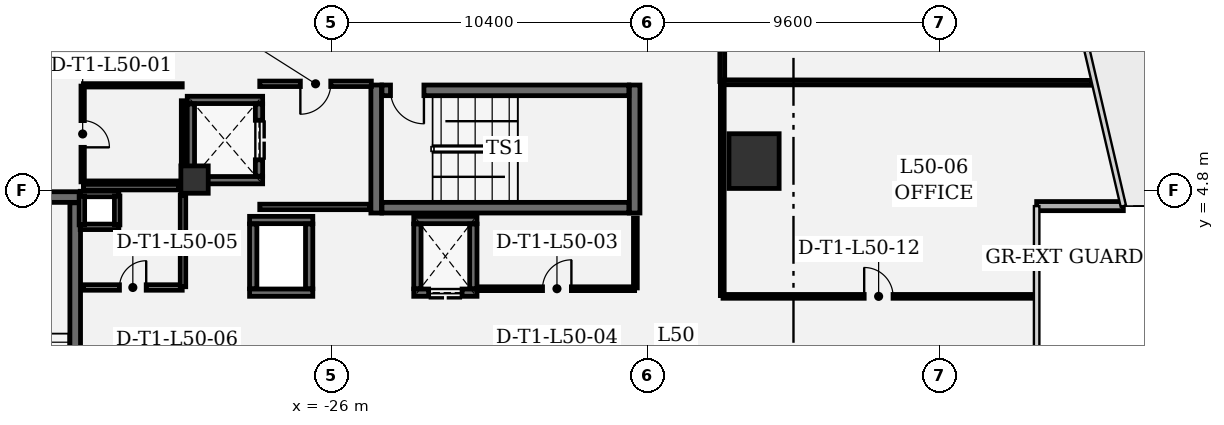
"""IFC4 building model, lengths in metres.
Left out: names, types, materials, properties, quantities, classifications, styles, units other than length and angle.
Written with IfcOpenShell. Run it as: python <this file> out.ifc"""

import sys

from ifc_helpers import new_model, si_unit, direction, frame, frame_2d, origin, origin_2d, place, context, subcontext, project, spatial, rectangle, extrude, element, fill, save


model = new_model("IFC4")
c1 = context("Model", 3, precision=1e-05, world=origin(), true_north=direction((0.0, 1.0)))
c2 = subcontext(c1, "Body", "Model", "MODEL_VIEW")
j1 = project(units=[si_unit("LENGTHUNIT", "METRE"), si_unit("PLANEANGLEUNIT", "RADIAN")], contexts=[c1])
p1 = place(None, origin())
s1 = spatial("IfcSite", under=j1, at=p1, CompositionType="ELEMENT")
p2 = place(p1, origin())
s2 = spatial("IfcBuilding", under=s1, at=p2, CompositionType="ELEMENT")
p3 = place(p2, frame((0.0, 0.0, 217.2)))
s3 = spatial("IfcBuildingStorey", under=s2, at=p3, CompositionType="ELEMENT", Elevation=217.2)
p4 = place(p3, frame((-12.097, 5.758, 0.0), z_axis=(0.0, 0.0, 1.0), x_axis=(1.0, 0.0, 0.0)))
e1 = element("IfcColumn", 1, at=p4, inside=s3, PredefinedType="COLUMN", context=c2, shape_type="SweptSolid", body=[
    extrude(rectangle(XDim=1.65, YDim=1.8, at=origin_2d()), origin(), (0.0, 0.0, 1.0), 4.05),
])
p5 = place(p3, frame((-30.5, 5.15, 0.0), z_axis=(0.0, 0.0, 1.0), x_axis=(1.0, 0.0, 0.0)))
e2 = element("IfcColumn", 2, at=p5, inside=s3, PredefinedType="COLUMN", context=c2, shape_type="SweptSolid", body=[
    extrude(rectangle(XDim=0.9, YDim=0.9, at=origin_2d()), origin(), (0.0, 0.0, 1.0), 4.05),
])
p6 = place(p3, frame((-2.802, 4.277, 0.0), z_axis=(0.0, 0.0, 1.0), x_axis=(1.0, 0.0, 0.0)))
e3 = element("IfcWall", 3, at=p6, inside=s3, PredefinedType="SOLIDWALL", context=c2, shape_type="SweptSolid", body=[
    extrude(rectangle(XDim=2.851, YDim=0.3, at=frame_2d((1.426, 0.0))), origin(), (0.0, 0.0, 1.0), 3.78),
])
for number, where, z_axis, x_axis in (
    (4, (-24.525, 8.26, 0.0), (0.0, 0.0, 1.0), (0.0, -1.0, 0.0)),
    (5, (-16.025, 4.05, 0.0), (0.0, 0.0, 1.0), (0.0, 1.0, 0.0)),
):
    element("IfcWall", number, at=place(p3, frame(where, z_axis=z_axis, x_axis=x_axis)), inside=s3, PredefinedType="SHEAR", context=c2, shape_type="SweptSolid", body=[
        extrude(rectangle(XDim=4.21, YDim=0.35, at=frame_2d((2.105, 0.0))), origin(), (0.0, 0.0, 1.0), 3.78),
    ])
p7 = place(p3, frame((-24.335, 4.225, 0.0), z_axis=(0.0, 0.0, 1.0), x_axis=(1.0, 0.0, 0.0)))
e6 = element("IfcWall", 6, at=p7, inside=s3, PredefinedType="SHEAR", context=c2, shape_type="SweptSolid", body=[
    extrude(rectangle(XDim=8.12, YDim=0.35, at=frame_2d((4.06, 0.0))), origin(), (0.0, 0.0, 1.0), 3.78),
])
p8 = place(p3, frame((-16.215, 8.085, 0.0), z_axis=(0.0, 0.0, 1.0), x_axis=(-1.0, 0.0, 0.0)))
e7 = element("IfcWall", 7, at=p8, inside=s3, PredefinedType="SHEAR", context=c2, shape_type="SweptSolid", body=[
    extrude(rectangle(XDim=8.12, YDim=0.35, at=frame_2d((4.06, 0.0))), origin(), (0.0, 0.0, 1.0), 3.78),
])
p9 = place(p8, frame((6.74, 0.0, 0.0)))
e8 = element("IfcOpeningElement", 8, at=p9, cuts=e7, PredefinedType="OPENING", context=c2, shape_type="SweptSolid", body=[
    extrude(rectangle(XDim=1.1, YDim=2.2, at=frame_2d((0.55, 1.1))), frame((0.0, 0.185, 0.0), z_axis=(0.0, -1.0, 0.0), x_axis=(1.0, 0.0, 0.0)), (0.0, 0.0, 1.0), 0.37),
])
p10 = place(p3, frame((-34.25, 4.575, 0.0), z_axis=(0.0, 0.0, 1.0), x_axis=(-1.0, 0.0, 0.0)))
e9 = element("IfcWall", 9, at=p10, inside=s3, PredefinedType="SHEAR", context=c2, shape_type="SweptSolid", body=[
    extrude(rectangle(XDim=4.21, YDim=0.35, at=frame_2d((2.105, 0.0))), origin(), (0.0, 0.0, 1.0), 3.78),
])
p11 = place(p3, frame((-34.425, -4.385, 0.0), z_axis=(0.0, 0.0, 1.0), x_axis=(0.0, 1.0, 0.0)))
e10 = element("IfcWall", 10, at=p11, inside=s3, PredefinedType="SHEAR", context=c2, shape_type="SweptSolid", body=[
    extrude(rectangle(XDim=8.77, YDim=0.35, at=frame_2d((4.385, 0.0))), origin(), (0.0, 0.0, 1.0), 3.78),
])
for number, where, z_axis, x_axis in (
    (11, (-28.26, 5.13, 0.0), (0.0, 0.0, 1.0), (-1.0, 0.0, 0.0)),
    (12, (-30.74, 7.77, 0.0), (0.0, 0.0, 1.0), (1.0, 0.0, 0.0)),
):
    element("IfcWall", number, at=place(p3, frame(where, z_axis=z_axis, x_axis=x_axis)), inside=s3, PredefinedType="SHEAR", context=c2, shape_type="SweptSolid", body=[
        extrude(rectangle(XDim=2.48, YDim=0.24, at=frame_2d((1.24, 0.0))), origin(), (0.0, 0.0, 1.0), 3.78),
    ])
p12 = place(p3, frame((-30.62, 5.262, 0.0), z_axis=(0.0, 0.0, 1.0), x_axis=(0.0, 1.0, 0.0)))
e13 = element("IfcWall", 13, at=p12, inside=s3, PredefinedType="SHEAR", context=c2, shape_type="SweptSolid", body=[
    extrude(rectangle(XDim=2.376, YDim=0.24, at=frame_2d((1.188, 0.0))), origin(), (0.0, 0.0, 1.0), 3.78),
])
p13 = place(p3, frame((-28.38, 7.638, 0.0), z_axis=(0.0, 0.0, 1.0), x_axis=(0.0, -1.0, 0.0)))
e14 = element("IfcWall", 14, at=p13, inside=s3, PredefinedType="SHEAR", context=c2, shape_type="SweptSolid", body=[
    extrude(rectangle(XDim=2.376, YDim=0.24, at=frame_2d((1.188, 0.0))), origin(), (0.0, 0.0, 1.0), 3.78),
])
p14 = place(p13, frame((0.538, 0.0, 0.0)))
e15 = element("IfcOpeningElement", 15, at=p14, cuts=e14, PredefinedType="OPENING", context=c2, shape_type="SweptSolid", body=[
    extrude(rectangle(XDim=1.3, YDim=2.3, at=frame_2d((0.65, 1.15))), frame((0.0, 0.13, 0.0), z_axis=(0.0, -1.0, 0.0), x_axis=(1.0, 0.0, 0.0)), (0.0, 0.0, 1.0), 0.26),
])
for number, where, z_axis, x_axis in (
    (16, (-26.61, 1.43, 0.0), (0.0, 0.0, 1.0), (-1.0, 0.0, 0.0)),
    (17, (-28.69, 3.82, 0.0), (0.0, 0.0, 1.0), (1.0, 0.0, 0.0)),
):
    element("IfcWall", number, at=place(p3, frame(where, z_axis=z_axis, x_axis=x_axis)), inside=s3, PredefinedType="SHEAR", context=c2, shape_type="SweptSolid", body=[
        extrude(rectangle(XDim=2.08, YDim=0.24, at=frame_2d((1.04, 0.0))), origin(), (0.0, 0.0, 1.0), 3.78),
    ])
for number, where, z_axis, x_axis in (
    (18, (-28.57, 1.562, 0.0), (0.0, 0.0, 1.0), (0.0, 1.0, 0.0)),
    (19, (-26.73, 3.688, 0.0), (0.0, 0.0, 1.0), (0.0, -1.0, 0.0)),
):
    element("IfcWall", number, at=place(p3, frame(where, z_axis=z_axis, x_axis=x_axis)), inside=s3, PredefinedType="SHEAR", context=c2, shape_type="SweptSolid", body=[
        extrude(rectangle(XDim=2.126, YDim=0.24, at=frame_2d((1.063, 0.0))), origin(), (0.0, 0.0, 1.0), 3.78),
    ])
p15 = place(p3, frame((-21.21, 1.43, 0.0), z_axis=(0.0, 0.0, 1.0), x_axis=(-1.0, 0.0, 0.0)))
e20 = element("IfcWall", 20, at=p15, inside=s3, PredefinedType="SHEAR", context=c2, shape_type="SweptSolid", body=[
    extrude(rectangle(XDim=2.08, YDim=0.24, at=frame_2d((1.04, 0.0))), origin(), (0.0, 0.0, 1.0), 3.78),
])
p16 = place(p15, frame((0.49, 0.0, 0.0)))
e21 = element("IfcOpeningElement", 21, at=p16, cuts=e20, PredefinedType="OPENING", context=c2, shape_type="SweptSolid", body=[
    extrude(rectangle(XDim=1.1, YDim=2.2, at=frame_2d((0.55, 1.1))), frame((0.0, 0.13, 0.0), z_axis=(0.0, -1.0, 0.0), x_axis=(1.0, 0.0, 0.0)), (0.0, 0.0, 1.0), 0.26),
])
p17 = place(p3, frame((-23.29, 3.82, 0.0), z_axis=(0.0, 0.0, 1.0), x_axis=(1.0, 0.0, 0.0)))
e22 = element("IfcWall", 22, at=p17, inside=s3, PredefinedType="SHEAR", context=c2, shape_type="SweptSolid", body=[
    extrude(rectangle(XDim=2.08, YDim=0.24, at=frame_2d((1.04, 0.0))), origin(), (0.0, 0.0, 1.0), 3.78),
])
for number, where, z_axis, x_axis in (
    (23, (-23.17, 1.562, 0.0), (0.0, 0.0, 1.0), (0.0, 1.0, 0.0)),
    (24, (-21.33, 3.688, 0.0), (0.0, 0.0, 1.0), (0.0, -1.0, 0.0)),
):
    element("IfcWall", number, at=place(p3, frame(where, z_axis=z_axis, x_axis=x_axis)), inside=s3, PredefinedType="SHEAR", context=c2, shape_type="SweptSolid", body=[
        extrude(rectangle(XDim=2.126, YDim=0.24, at=frame_2d((1.063, 0.0))), origin(), (0.0, 0.0, 1.0), 3.78),
    ])
for number, where, z_axis, x_axis in (
    (25, (-32.99, 3.595, 0.0), (0.0, 0.0, 1.0), (-1.0, 0.0, 0.0)),
    (26, (-34.26, 4.675, 0.0), (0.0, 0.0, 1.0), (1.0, 0.0, 0.0)),
):
    element("IfcWall", number, at=place(p3, frame(where, z_axis=z_axis, x_axis=x_axis)), inside=s3, PredefinedType="PARTITIONING", context=c2, shape_type="SweptSolid", body=[
        extrude(rectangle(XDim=1.27, YDim=0.18, at=frame_2d((0.635, 0.0))), origin(), (0.0, 0.0, 1.0), 3.78),
    ])
for number, where, z_axis, x_axis in (
    (27, (-34.205, 3.66, 0.0), (0.0, 0.0, 1.0), (0.0, 1.0, 0.0)),
    (28, (-33.045, 4.61, 0.0), (0.0, 0.0, 1.0), (0.0, -1.0, 0.0)),
):
    element("IfcWall", number, at=place(p3, frame(where, z_axis=z_axis, x_axis=x_axis)), inside=s3, PredefinedType="PARTITIONING", context=c2, shape_type="SweptSolid", body=[
        extrude(rectangle(XDim=0.95, YDim=0.18, at=frame_2d((0.475, 0.0))), origin(), (0.0, 0.0, 1.0), 3.78),
    ])
p18 = place(p3, frame((-28.355, 4.25, 0.0), z_axis=(0.0, 0.0, 1.0), x_axis=(1.0, 0.0, 0.0)))
e29 = element("IfcWall", 29, at=p18, inside=s3, PredefinedType="PARTITIONING", context=c2, shape_type="SweptSolid", body=[
    extrude(rectangle(XDim=3.622, YDim=0.18, at=frame_2d((1.811, 0.0))), origin(), (0.0, 0.0, 1.0), 3.78),
])
p19 = place(p3, frame((-24.684, 8.3, 0.0), z_axis=(0.0, 0.0, 1.0), x_axis=(-1.0, 0.0, 0.0)))
e30 = element("IfcWall", 30, at=p19, inside=s3, PredefinedType="PARTITIONING", context=c2, shape_type="SweptSolid", body=[
    extrude(rectangle(XDim=3.671, YDim=0.18, at=frame_2d((1.835, 0.0))), origin(), (0.0, 0.0, 1.0), 3.78),
])
p20 = place(p19, frame((1.335, 0.0, 0.0)))
e31 = element("IfcOpeningElement", 31, at=p20, cuts=e30, PredefinedType="OPENING", context=c2, shape_type="SweptSolid", body=[
    extrude(rectangle(XDim=1.0, YDim=2.15, at=frame_2d((0.5, 1.075))), frame((0.0, 0.1, 0.0), z_axis=(0.0, -1.0, 0.0), x_axis=(1.0, 0.0, 0.0)), (0.0, 0.0, 1.0), 0.2),
])
p21 = place(p3, frame((-34.18, 8.225, 0.0), z_axis=(0.0, 0.0, 1.0), x_axis=(0.0, -1.0, 0.0)))
e32 = element("IfcWall", 32, at=p21, inside=s3, PredefinedType="PARTITIONING", context=c2, shape_type="SweptSolid", body=[
    extrude(rectangle(XDim=3.15, YDim=0.11, at=frame_2d((1.575, 0.0))), origin(), (0.0, 0.0, 1.0), 3.78),
])
p22 = place(p21, frame((1.135, 0.0, 0.0)))
e33 = element("IfcOpeningElement", 33, at=p22, cuts=e32, PredefinedType="OPENING", context=c2, shape_type="SweptSolid", body=[
    extrude(rectangle(XDim=0.88, YDim=2.1, at=frame_2d((0.44, 1.05))), frame((0.0, 0.065, 0.0), z_axis=(0.0, -1.0, 0.0), x_axis=(1.0, 0.0, 0.0)), (0.0, 0.0, 1.0), 0.13),
])
p23 = place(p3, frame((-34.155, 5.05, 0.0), z_axis=(0.0, 0.0, 1.0), x_axis=(1.0, 0.0, 0.0)))
e34 = element("IfcWall", 34, at=p23, inside=s3, PredefinedType="PARTITIONING", context=c2, shape_type="SweptSolid", body=[
    extrude(rectangle(XDim=3.14, YDim=0.11, at=frame_2d((1.57, 0.0))), origin(), (0.0, 0.0, 1.0), 3.78),
])
p24 = place(p3, frame((-30.88, 5.665, 0.0), z_axis=(0.0, 0.0, 1.0), x_axis=(0.0, 1.0, 0.0)))
e35 = element("IfcWall", 35, at=p24, inside=s3, PredefinedType="PARTITIONING", context=c2, shape_type="SweptSolid", body=[
    extrude(rectangle(XDim=2.078, YDim=0.11, at=frame_2d((1.039, 0.0))), origin(), (0.0, 0.0, 1.0), 3.78),
])
p25 = place(p3, frame((-30.905, 8.25, 0.0), z_axis=(0.0, 0.0, 1.0), x_axis=(-1.0, 0.0, 0.0)))
e36 = element("IfcWall", 36, at=p25, inside=s3, PredefinedType="PARTITIONING", context=c2, shape_type="SweptSolid", body=[
    extrude(rectangle(XDim=3.25, YDim=0.11, at=frame_2d((1.625, 0.0))), origin(), (0.0, 0.0, 1.0), 3.78),
])
p26 = place(p3, frame((-21.134, 1.56, 0.0), z_axis=(0.0, 0.0, 1.0), x_axis=(1.0, 0.0, 0.0)))
e37 = element("IfcWall", 37, at=p26, inside=s3, PredefinedType="PARTITIONING", context=c2, shape_type="SweptSolid", body=[
    extrude(rectangle(XDim=5.109, YDim=0.125, at=frame_2d((2.554, 0.0))), origin(), (0.0, 0.0, 1.0), 3.78),
])
p27 = place(p26, frame((2.079, 0.0, 0.0)))
e38 = element("IfcOpeningElement", 38, at=p27, cuts=e37, PredefinedType="OPENING", context=c2, shape_type="SweptSolid", body=[
    extrude(rectangle(XDim=0.95, YDim=2.15, at=frame_2d((0.475, 1.075))), frame((0.0, 0.073, 0.0), z_axis=(0.0, -1.0, 0.0), x_axis=(1.0, 0.0, 0.0)), (0.0, 0.0, 1.0), 0.145),
])
p28 = place(p3, frame((-16.0, 1.585, 0.0), z_axis=(0.0, 0.0, 1.0), x_axis=(0.0, 1.0, 0.0)))
e39 = element("IfcWall", 39, at=p28, inside=s3, PredefinedType="PARTITIONING", context=c2, shape_type="SweptSolid", body=[
    extrude(rectangle(XDim=2.302, YDim=0.125, at=frame_2d((1.151, 0.0))), origin(), (0.0, 0.0, 1.0), 3.78),
])
p29 = place(p3, frame((-34.155, 1.6, 0.0), z_axis=(0.0, 0.0, 1.0), x_axis=(1.0, 0.0, 0.0)))
e40 = element("IfcWall", 40, at=p29, inside=s3, PredefinedType="PARTITIONING", context=c2, shape_type="SweptSolid", body=[
    extrude(rectangle(XDim=3.25, YDim=0.18, at=frame_2d((1.625, 0.0))), origin(), (0.0, 0.0, 1.0), 3.78),
])
p30 = place(p29, frame((1.185, 0.0, 0.0)))
e41 = element("IfcOpeningElement", 41, at=p30, cuts=e40, PredefinedType="OPENING", context=c2, shape_type="SweptSolid", body=[
    extrude(rectangle(XDim=0.88, YDim=2.1, at=frame_2d((0.44, 1.05))), frame((0.0, 0.1, 0.0), z_axis=(0.0, -1.0, 0.0), x_axis=(1.0, 0.0, 0.0)), (0.0, 0.0, 1.0), 0.2),
])
p31 = place(p3, frame((-30.88, 1.625, 0.0), z_axis=(0.0, 0.0, 1.0), x_axis=(0.0, 1.0, 0.0)))
e42 = element("IfcWall", 42, at=p31, inside=s3, PredefinedType="PARTITIONING", context=c2, shape_type="SweptSolid", body=[
    extrude(rectangle(XDim=3.01, YDim=0.18, at=frame_2d((1.505, 0.0))), origin(), (0.0, 0.0, 1.0), 3.78),
])
p32 = place(p3, frame((-31.015, 4.9, 0.0), z_axis=(0.0, 0.0, 1.0), x_axis=(-1.0, 0.0, 0.0)))
e43 = element("IfcWall", 43, at=p32, inside=s3, PredefinedType="PARTITIONING", context=c2, shape_type="SweptSolid", body=[
    extrude(rectangle(XDim=3.14, YDim=0.18, at=frame_2d((1.57, 0.0))), origin(), (0.0, 0.0, 1.0), 3.78),
])
p33 = place(p3, frame((-13.142, 10.733, 0.0), z_axis=(0.0, 0.0, 1.0), x_axis=(0.0, -1.0, 0.0)))
e44 = element("IfcWall", 44, at=p33, inside=s3, PredefinedType="PARTITIONING", context=c2, shape_type="SweptSolid", body=[
    extrude(rectangle(XDim=2.358, YDim=0.16, at=frame_2d((1.179, 0.0))), origin(), (0.0, 0.0, 1.0), 3.0),
])
p34 = place(p3, frame((-13.117, 8.35, 0.0), z_axis=(0.0, 0.0, 1.0), x_axis=(0.999998922727, -0.001467836675, 0.0)))
e45 = element("IfcWall", 45, at=p34, inside=s3, PredefinedType="PARTITIONING", context=c2, shape_type="SweptSolid", body=[
    extrude(rectangle(XDim=12.142, YDim=0.16, at=frame_2d((6.071, 0.0))), origin(), (0.0, 0.0, 1.0), 3.344),
])
p35 = place(p3, frame((-13.142, 8.317, 0.0), z_axis=(0.0, 0.0, 1.0), x_axis=(0.0, -1.0, 0.0)))
e46 = element("IfcWall", 46, at=p35, inside=s3, PredefinedType="PARTITIONING", context=c2, shape_type="SweptSolid", body=[
    extrude(rectangle(XDim=6.984, YDim=0.125, at=frame_2d((3.492, 0.0))), origin(), (0.0, 0.0, 1.0), 3.0),
])
p36 = place(p3, frame((-13.117, 1.308, 0.0), z_axis=(0.0, 0.0, 1.0), x_axis=(1.0, 0.0, 0.0)))
e47 = element("IfcWall", 47, at=p36, inside=s3, PredefinedType="PARTITIONING", context=c2, shape_type="SweptSolid", body=[
    extrude(rectangle(XDim=10.236, YDim=0.125, at=frame_2d((5.118, 0.0))), origin(), (0.0, 0.0, 1.0), 3.78),
])
p37 = place(p36, frame((4.643, 0.0, 0.0)))
e48 = element("IfcOpeningElement", 48, at=p37, cuts=e47, PredefinedType="OPENING", context=c2, shape_type="SweptSolid", body=[
    extrude(rectangle(XDim=0.95, YDim=2.15, at=frame_2d((0.475, 1.075))), frame((0.0, 0.073, 0.0), z_axis=(0.0, -1.0, 0.0), x_axis=(1.0, 0.0, 0.0)), (0.0, 0.0, 1.0), 0.145),
])
p38 = place(p9, origin())
e49 = element("IfcDoor", 49, at=p38, inside=s3, OperationType="SINGLE_SWING_LEFT", PredefinedType="DOOR", context=c2, shape_type="SweptSolid", body=[
    extrude(rectangle(XDim=1.1, YDim=2.2, at=frame_2d((0.55, 1.1))), frame((0.0, 0.025, 0.0), z_axis=(0.0, -1.0, 0.0), x_axis=(1.0, 0.0, 0.0)), (0.0, 0.0, 1.0), 0.05),
])
fill(e8, e49)
p39 = place(p14, origin())
e50 = element("IfcDoor", 50, at=p39, inside=s3, OperationType="DOUBLE_DOOR_SLIDING", PredefinedType="DOOR", context=c2, shape_type="SweptSolid", body=[
    extrude(rectangle(XDim=1.3, YDim=2.3, at=frame_2d((0.65, 1.15))), frame((0.0, 0.025, 0.0), z_axis=(0.0, -1.0, 0.0), x_axis=(1.0, 0.0, 0.0)), (0.0, 0.0, 1.0), 0.05),
])
fill(e15, e50)
p40 = place(p16, origin())
e51 = element("IfcDoor", 51, at=p40, inside=s3, OperationType="DOUBLE_DOOR_SLIDING", PredefinedType="DOOR", context=c2, shape_type="SweptSolid", body=[
    extrude(rectangle(XDim=1.1, YDim=2.2, at=frame_2d((0.55, 1.1))), frame((0.0, 0.025, 0.0), z_axis=(0.0, -1.0, 0.0), x_axis=(1.0, 0.0, 0.0)), (0.0, 0.0, 1.0), 0.05),
])
fill(e21, e51)
p41 = place(p22, origin())
e52 = element("IfcDoor", 52, at=p41, inside=s3, OperationType="SINGLE_SWING_RIGHT", PredefinedType="DOOR", context=c2, shape_type="SweptSolid", body=[
    extrude(rectangle(XDim=0.88, YDim=2.1, at=frame_2d((0.44, 1.05))), frame((0.0, 0.025, 0.0), z_axis=(0.0, -1.0, 0.0), x_axis=(1.0, 0.0, 0.0)), (0.0, 0.0, 1.0), 0.05),
])
fill(e33, e52)
p42 = place(p27, origin())
e53 = element("IfcDoor", 53, at=p42, inside=s3, OperationType="SINGLE_SWING_RIGHT", PredefinedType="DOOR", context=c2, shape_type="SweptSolid", body=[
    extrude(rectangle(XDim=0.95, YDim=2.15, at=frame_2d((0.475, 1.075))), frame((0.0, 0.025, 0.0), z_axis=(0.0, -1.0, 0.0), x_axis=(1.0, 0.0, 0.0)), (0.0, 0.0, 1.0), 0.05),
])
fill(e38, e53)
p43 = place(p30, origin())
e54 = element("IfcDoor", 54, at=p43, inside=s3, OperationType="SINGLE_SWING_RIGHT", PredefinedType="DOOR", context=c2, shape_type="SweptSolid", body=[
    extrude(rectangle(XDim=0.88, YDim=2.1, at=frame_2d((0.44, 1.05))), frame((0.0, 0.025, 0.0), z_axis=(0.0, -1.0, 0.0), x_axis=(1.0, 0.0, 0.0)), (0.0, 0.0, 1.0), 0.05),
])
fill(e41, e54)
p44 = place(p37, origin())
e55 = element("IfcDoor", 55, at=p44, inside=s3, OperationType="SINGLE_SWING_LEFT", PredefinedType="DOOR", context=c2, shape_type="SweptSolid", body=[
    extrude(rectangle(XDim=0.95, YDim=2.15, at=frame_2d((0.475, 1.075))), frame((0.0, 0.025, 0.0), z_axis=(0.0, -1.0, 0.0), x_axis=(1.0, 0.0, 0.0)), (0.0, 0.0, 1.0), 0.05),
])
fill(e48, e55)
p45 = place(p20, origin())
e56 = element("IfcDoor", 56, at=p45, inside=s3, OperationType="SINGLE_SWING_RIGHT", PredefinedType="DOOR", context=c2, shape_type="SweptSolid", body=[
    extrude(rectangle(XDim=1.0, YDim=2.15, at=frame_2d((0.5, 1.075))), frame((0.0, 0.025, 0.0), z_axis=(0.0, -1.0, 0.0), x_axis=(1.0, 0.0, 0.0)), (0.0, 0.0, 1.0), 0.05),
])
fill(e31, e56)
save(model, sys.argv[1])
